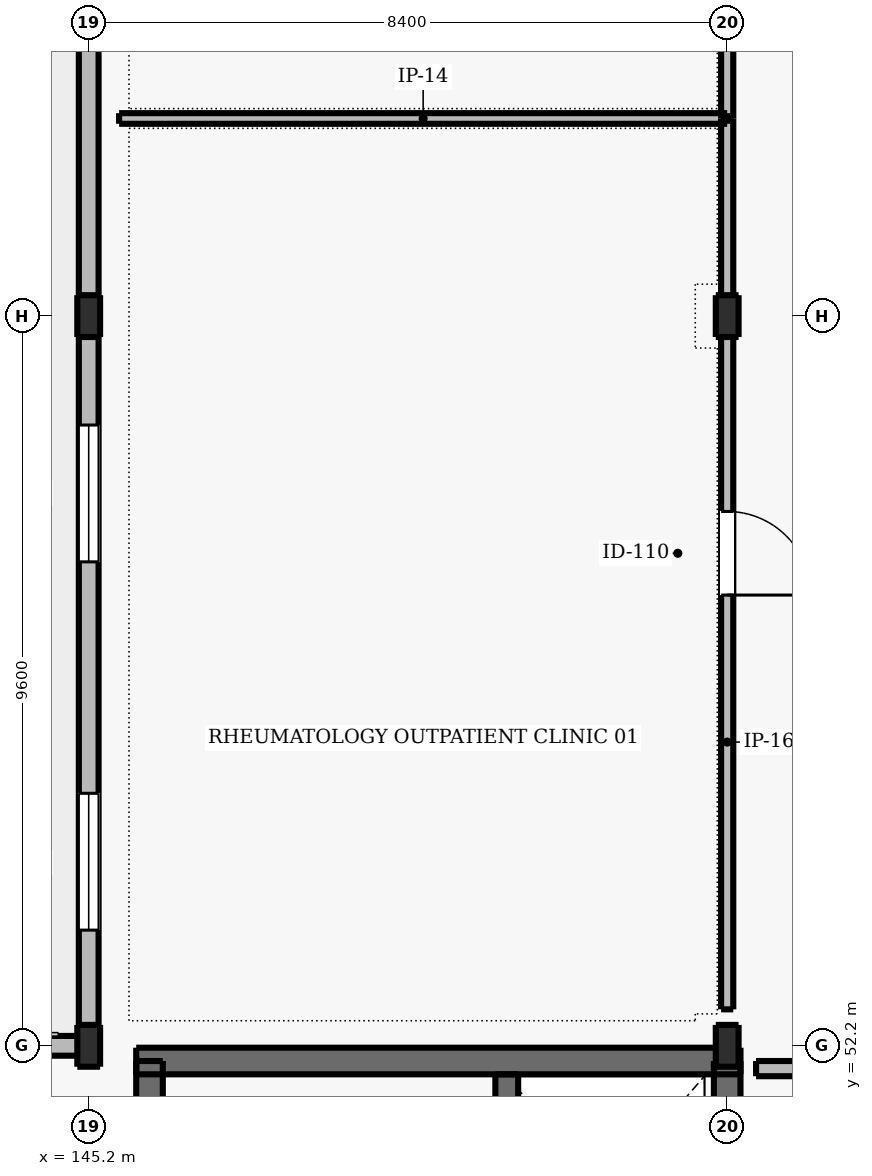
"""IFC4 building model, lengths in metres.
Left out: names, types, materials, properties, quantities, classifications, styles, units other than length and angle.
Written with IfcOpenShell. Run it as: python <this file> out.ifc"""

import sys

from ifc_helpers import new_model, si_unit, direction, frame, frame_2d, origin, origin_2d, place, context, subcontext, project, spatial, rectangle, i_section, extrude, element, fill, save


model = new_model("IFC4")
c1 = context("Model", 3, precision=1e-05, world=origin(), true_north=direction((0.0, 1.0)))
c2 = subcontext(c1, "Body", "Model", "MODEL_VIEW")
j1 = project(units=[si_unit("LENGTHUNIT", "METRE"), si_unit("PLANEANGLEUNIT", "RADIAN")], contexts=[c1])
p1 = place(None, origin())
s1 = spatial("IfcSite", under=j1, at=p1, CompositionType="ELEMENT")
p2 = place(p1, origin())
s2 = spatial("IfcBuilding", under=s1, at=p2, CompositionType="ELEMENT")
p3 = place(p2, origin())
s3 = spatial("IfcBuildingStorey", under=s2, at=p3, CompositionType="ELEMENT", Elevation=0.0)
for number, where, z_axis, x_axis in (
    (1, (145.2, 52.2, 0.0), (0.0, 0.0, 1.0), (1.0, 0.0, 0.0)),
    (2, (145.2, 61.8, 0.0), (0.0, 0.0, 1.0), (1.0, 0.0, 0.0)),
    (3, (153.6, 52.2, 0.0), (0.0, 0.0, 1.0), (1.0, 0.0, 0.0)),
    (4, (153.6, 61.8, 0.0), (0.0, 0.0, 1.0), (1.0, 0.0, 0.0)),
):
    element("IfcColumn", number, at=place(p3, frame(where, z_axis=z_axis, x_axis=x_axis)), inside=s3, PredefinedType="COLUMN", context=c2, shape_type="SweptSolid", body=[
        extrude(i_section(OverallWidth=0.3, OverallDepth=0.55, WebThickness=0.015, FlangeThickness=0.029, FilletRadius=0.027, at=origin_2d()), origin(), (0.0, 0.0, 1.0), 5.1),
    ])
p4 = place(p3, frame((145.825, 52.0, 0.0), z_axis=(0.0, 0.0, 1.0), x_axis=(1.0, 0.0, 0.0)))
e5 = element("IfcWall", 5, at=p4, inside=s3, PredefinedType="SHEAR", context=c2, shape_type="SweptSolid", body=[
    extrude(rectangle(XDim=7.95, YDim=0.35, at=frame_2d((3.975, 0.0))), origin(), (0.0, 0.0, 1.0), 5.1),
])
for number, where, z_axis, x_axis in (
    (6, (146.0, 45.2, 0.0), (0.0, 0.0, 1.0), (0.0, 1.0, 0.0)),
    (7, (153.6, 45.2, 0.0), (0.0, 0.0, 1.0), (0.0, 1.0, 0.0)),
):
    element("IfcWall", number, at=place(p3, frame(where, z_axis=z_axis, x_axis=x_axis)), inside=s3, PredefinedType="SHEAR", context=c2, shape_type="SweptSolid", body=[
        extrude(rectangle(XDim=6.8, YDim=0.35, at=frame_2d((3.4, 0.0))), origin(), (0.0, 0.0, 1.0), 5.1),
    ])
p5 = place(p3, frame((150.7, 48.8, 0.0), z_axis=(0.0, 0.0, 1.0), x_axis=(0.0, 1.0, 0.0)))
e8 = element("IfcWall", 8, at=p5, inside=s3, PredefinedType="SHEAR", context=c2, shape_type="SweptSolid", body=[
    extrude(rectangle(XDim=3.025, YDim=0.3, at=frame_2d((1.512, 0.0))), origin(), (0.0, 0.0, 1.0), 5.1),
])
p6 = place(p5, frame((0.963, 0.0, 0.0)))
e9 = element("IfcOpeningElement", 9, at=p6, cuts=e8, PredefinedType="OPENING", context=c2, shape_type="SweptSolid", body=[
    extrude(rectangle(XDim=1.1, YDim=2.15, at=frame_2d((0.55, 1.075))), frame((0.0, 0.16, 0.0), z_axis=(0.0, -1.0, 0.0), x_axis=(1.0, 0.0, 0.0)), (0.0, 0.0, 1.0), 0.32),
])
p7 = place(p3, frame((99.0, 52.2, 0.0), z_axis=(0.0, 0.0, 1.0), x_axis=(1.0, 0.0, 0.0)))
e10 = element("IfcWall", 10, at=p7, inside=s3, PredefinedType="SOLIDWALL", context=c2, shape_type="SweptSolid", body=[
    extrude(rectangle(XDim=46.2, YDim=0.26, at=frame_2d((23.1, 0.0))), origin(), (0.0, 0.0, 1.0), 4.26),
])
p8 = place(p7, frame((1.485, 0.0, 1.05)))
e11 = element("IfcOpeningElement", 11, at=p8, cuts=e10, PredefinedType="OPENING", context=c2, shape_type="SweptSolid", body=[
    extrude(rectangle(XDim=1.65, YDim=1.6, at=frame_2d((0.825, 0.8))), frame((0.0, 0.14, 0.0), z_axis=(0.0, -1.0, 0.0), x_axis=(1.0, 0.0, 0.0)), (0.0, 0.0, 1.0), 0.28),
])
p9 = place(p7, frame((15.345, 0.0, 1.05)))
e12 = element("IfcOpeningElement", 12, at=p9, cuts=e10, PredefinedType="OPENING", context=c2, shape_type="SweptSolid", body=[
    extrude(rectangle(XDim=1.65, YDim=1.6, at=frame_2d((0.825, 0.8))), frame((0.0, 0.14, 0.0), z_axis=(0.0, -1.0, 0.0), x_axis=(1.0, 0.0, 0.0)), (0.0, 0.0, 1.0), 0.28),
])
p10 = place(p7, frame((24.585, 0.0, 1.05)))
e13 = element("IfcOpeningElement", 13, at=p10, cuts=e10, PredefinedType="OPENING", context=c2, shape_type="SweptSolid", body=[
    extrude(rectangle(XDim=1.65, YDim=1.6, at=frame_2d((0.825, 0.8))), frame((0.0, 0.14, 0.0), z_axis=(0.0, -1.0, 0.0), x_axis=(1.0, 0.0, 0.0)), (0.0, 0.0, 1.0), 0.28),
])
p11 = place(p7, frame((33.825, 0.0, 1.05)))
e14 = element("IfcOpeningElement", 14, at=p11, cuts=e10, PredefinedType="OPENING", context=c2, shape_type="SweptSolid", body=[
    extrude(rectangle(XDim=1.65, YDim=1.6, at=frame_2d((0.825, 0.8))), frame((0.0, 0.14, 0.0), z_axis=(0.0, -1.0, 0.0), x_axis=(1.0, 0.0, 0.0)), (0.0, 0.0, 1.0), 0.28),
])
p12 = place(p7, frame((38.445, 0.0, 1.05)))
e15 = element("IfcOpeningElement", 15, at=p12, cuts=e10, PredefinedType="OPENING", context=c2, shape_type="SweptSolid", body=[
    extrude(rectangle(XDim=1.65, YDim=1.6, at=frame_2d((0.825, 0.8))), frame((0.0, 0.14, 0.0), z_axis=(0.0, -1.0, 0.0), x_axis=(1.0, 0.0, 0.0)), (0.0, 0.0, 1.0), 0.28),
])
p13 = place(p7, frame((43.065, 0.0, 1.05)))
e16 = element("IfcOpeningElement", 16, at=p13, cuts=e10, PredefinedType="OPENING", context=c2, shape_type="SweptSolid", body=[
    extrude(rectangle(XDim=1.65, YDim=1.6, at=frame_2d((0.825, 0.8))), frame((0.0, 0.14, 0.0), z_axis=(0.0, -1.0, 0.0), x_axis=(1.0, 0.0, 0.0)), (0.0, 0.0, 1.0), 0.28),
])
p14 = place(p3, frame((145.2, 52.2, 0.0), z_axis=(0.0, 0.0, 1.0), x_axis=(0.0, 1.0, 0.0)))
e17 = element("IfcWall", 17, at=p14, inside=s3, PredefinedType="SOLIDWALL", context=c2, shape_type="SweptSolid", body=[
    extrude(rectangle(XDim=43.6, YDim=0.26, at=frame_2d((21.8, 0.0))), origin(), (0.0, 0.0, 1.0), 4.31),
])
p15 = place(p14, frame((1.522, 0.0, 1.05)))
e18 = element("IfcOpeningElement", 18, at=p15, cuts=e17, PredefinedType="OPENING", context=c2, shape_type="SweptSolid", body=[
    extrude(rectangle(XDim=1.8, YDim=1.65, at=frame_2d((0.9, 0.825))), frame((0.0, 0.14, 0.0), z_axis=(0.0, -1.0, 0.0), x_axis=(1.0, 0.0, 0.0)), (0.0, 0.0, 1.0), 0.28),
])
p16 = place(p14, frame((6.367, 0.0, 1.05)))
e19 = element("IfcOpeningElement", 19, at=p16, cuts=e17, PredefinedType="OPENING", context=c2, shape_type="SweptSolid", body=[
    extrude(rectangle(XDim=1.8, YDim=1.65, at=frame_2d((0.9, 0.825))), frame((0.0, 0.14, 0.0), z_axis=(0.0, -1.0, 0.0), x_axis=(1.0, 0.0, 0.0)), (0.0, 0.0, 1.0), 0.28),
])
p17 = place(p14, frame((16.056, 0.0, 1.05)))
e20 = element("IfcOpeningElement", 20, at=p17, cuts=e17, PredefinedType="OPENING", context=c2, shape_type="SweptSolid", body=[
    extrude(rectangle(XDim=1.8, YDim=1.65, at=frame_2d((0.9, 0.825))), frame((0.0, 0.14, 0.0), z_axis=(0.0, -1.0, 0.0), x_axis=(1.0, 0.0, 0.0)), (0.0, 0.0, 1.0), 0.28),
])
p18 = place(p14, frame((20.9, 0.0, 1.05)))
e21 = element("IfcOpeningElement", 21, at=p18, cuts=e17, PredefinedType="OPENING", context=c2, shape_type="SweptSolid", body=[
    extrude(rectangle(XDim=1.8, YDim=1.65, at=frame_2d((0.9, 0.825))), frame((0.0, 0.14, 0.0), z_axis=(0.0, -1.0, 0.0), x_axis=(1.0, 0.0, 0.0)), (0.0, 0.0, 1.0), 0.28),
])
p19 = place(p14, frame((25.744, 0.0, 1.05)))
e22 = element("IfcOpeningElement", 22, at=p19, cuts=e17, PredefinedType="OPENING", context=c2, shape_type="SweptSolid", body=[
    extrude(rectangle(XDim=1.8, YDim=1.65, at=frame_2d((0.9, 0.825))), frame((0.0, 0.14, 0.0), z_axis=(0.0, -1.0, 0.0), x_axis=(1.0, 0.0, 0.0)), (0.0, 0.0, 1.0), 0.28),
])
p20 = place(p14, frame((30.589, 0.0, 1.05)))
e23 = element("IfcOpeningElement", 23, at=p20, cuts=e17, PredefinedType="OPENING", context=c2, shape_type="SweptSolid", body=[
    extrude(rectangle(XDim=1.8, YDim=1.65, at=frame_2d((0.9, 0.825))), frame((0.0, 0.14, 0.0), z_axis=(0.0, -1.0, 0.0), x_axis=(1.0, 0.0, 0.0)), (0.0, 0.0, 1.0), 0.28),
])
p21 = place(p14, frame((40.278, 0.0, 1.05)))
e24 = element("IfcOpeningElement", 24, at=p21, cuts=e17, PredefinedType="OPENING", context=c2, shape_type="SweptSolid", body=[
    extrude(rectangle(XDim=1.8, YDim=1.65, at=frame_2d((0.9, 0.825))), frame((0.0, 0.14, 0.0), z_axis=(0.0, -1.0, 0.0), x_axis=(1.0, 0.0, 0.0)), (0.0, 0.0, 1.0), 0.28),
])
p22 = place(p3, frame((153.98, 51.9, 0.0), z_axis=(0.0, 0.0, 1.0), x_axis=(1.0, 0.0, 0.0)))
e25 = element("IfcWall", 25, at=p22, inside=s3, PredefinedType="PARTITIONING", context=c2, shape_type="SweptSolid", body=[
    extrude(rectangle(XDim=7.62, YDim=0.2, at=frame_2d((3.81, 0.0))), origin(), (0.0, 0.0, 1.0), 4.82),
])
p23 = place(p22, frame((2.5, 0.0, 0.0)))
e26 = element("IfcOpeningElement", 26, at=p23, cuts=e25, PredefinedType="OPENING", context=c2, shape_type="SweptSolid", body=[
    extrude(rectangle(XDim=1.12, YDim=2.15, at=frame_2d((0.56, 1.075))), frame((0.0, 0.11, 0.0), z_axis=(0.0, -1.0, 0.0), x_axis=(1.0, 0.0, 0.0)), (0.0, 0.0, 1.0), 0.22),
])
p24 = place(p3, frame((153.6, 52.68, 0.0), z_axis=(0.0, 0.0, 1.0), x_axis=(0.0, 1.0, 0.0)))
e27 = element("IfcWall", 27, at=p24, inside=s3, PredefinedType="PARTITIONING", context=c2, shape_type="SweptSolid", body=[
    extrude(rectangle(XDim=11.72, YDim=0.16, at=frame_2d((5.86, 0.0))), origin(), (0.0, 0.0, 1.0), 4.31),
])
p25 = place(p24, frame((5.45, 0.0, 0.0)))
e28 = element("IfcOpeningElement", 28, at=p25, cuts=e27, PredefinedType="OPENING", context=c2, shape_type="SweptSolid", body=[
    extrude(rectangle(XDim=1.1, YDim=2.15, at=frame_2d((0.55, 1.075))), frame((0.0, 0.09, 0.0), z_axis=(0.0, -1.0, 0.0), x_axis=(1.0, 0.0, 0.0)), (0.0, 0.0, 1.0), 0.18),
])
p26 = place(p3, frame((145.6, 64.4, 0.0), z_axis=(0.0, 0.0, 1.0), x_axis=(1.0, 0.0, 0.0)))
e29 = element("IfcWall", 29, at=p26, inside=s3, PredefinedType="PARTITIONING", context=c2, shape_type="SweptSolid", body=[
    extrude(rectangle(XDim=8.0, YDim=0.14, at=frame_2d((4.0, 0.0))), origin(), (0.0, 0.0, 1.0), 4.82),
])
p27 = place(p3, frame((153.6, 64.4, 0.0), z_axis=(0.0, 0.0, 1.0), x_axis=(0.0, 1.0, 0.0)))
e30 = element("IfcWall", 30, at=p27, inside=s3, PredefinedType="PARTITIONING", context=c2, shape_type="SweptSolid", body=[
    extrude(rectangle(XDim=12.0, YDim=0.16, at=frame_2d((6.0, 0.0))), origin(), (0.0, 0.0, 1.0), 4.31),
])
p28 = place(p27, frame((4.642, 0.0, 0.0)))
e31 = element("IfcOpeningElement", 31, at=p28, cuts=e30, PredefinedType="OPENING", context=c2, shape_type="SweptSolid", body=[
    extrude(rectangle(XDim=1.1, YDim=2.15, at=frame_2d((0.55, 1.075))), frame((0.0, 0.09, 0.0), z_axis=(0.0, -1.0, 0.0), x_axis=(1.0, 0.0, 0.0)), (0.0, 0.0, 1.0), 0.18),
])
p29 = place(p15, origin())
e32 = element("IfcWindow", 32, at=p29, inside=s3, PartitioningType="SINGLE_PANEL", PredefinedType="WINDOW", context=c2, shape_type="SweptSolid", body=[
    extrude(rectangle(XDim=1.8, YDim=1.65, at=frame_2d((0.9, 0.825))), frame((0.0, 0.03, 0.0), z_axis=(0.0, -1.0, 0.0), x_axis=(1.0, 0.0, 0.0)), (0.0, 0.0, 1.0), 0.06),
])
fill(e18, e32)
p30 = place(p16, origin())
e33 = element("IfcWindow", 33, at=p30, inside=s3, PartitioningType="SINGLE_PANEL", PredefinedType="WINDOW", context=c2, shape_type="SweptSolid", body=[
    extrude(rectangle(XDim=1.8, YDim=1.65, at=frame_2d((0.9, 0.825))), frame((0.0, 0.03, 0.0), z_axis=(0.0, -1.0, 0.0), x_axis=(1.0, 0.0, 0.0)), (0.0, 0.0, 1.0), 0.06),
])
fill(e19, e33)
p31 = place(p25, frame((1.1, 0.0, 0.0), z_axis=(0.0, 0.0, 1.0), x_axis=(-1.0, 0.0, 0.0)))
e34 = element("IfcDoor", 34, at=p31, inside=s3, OperationType="SINGLE_SWING_LEFT", PredefinedType="DOOR", context=c2, shape_type="SweptSolid", body=[
    extrude(rectangle(XDim=1.1, YDim=2.15, at=frame_2d((0.55, 1.075))), frame((0.0, 0.025, 0.0), z_axis=(0.0, -1.0, 0.0), x_axis=(1.0, 0.0, 0.0)), (0.0, 0.0, 1.0), 0.05),
])
fill(e28, e34)
save(model, sys.argv[1])
